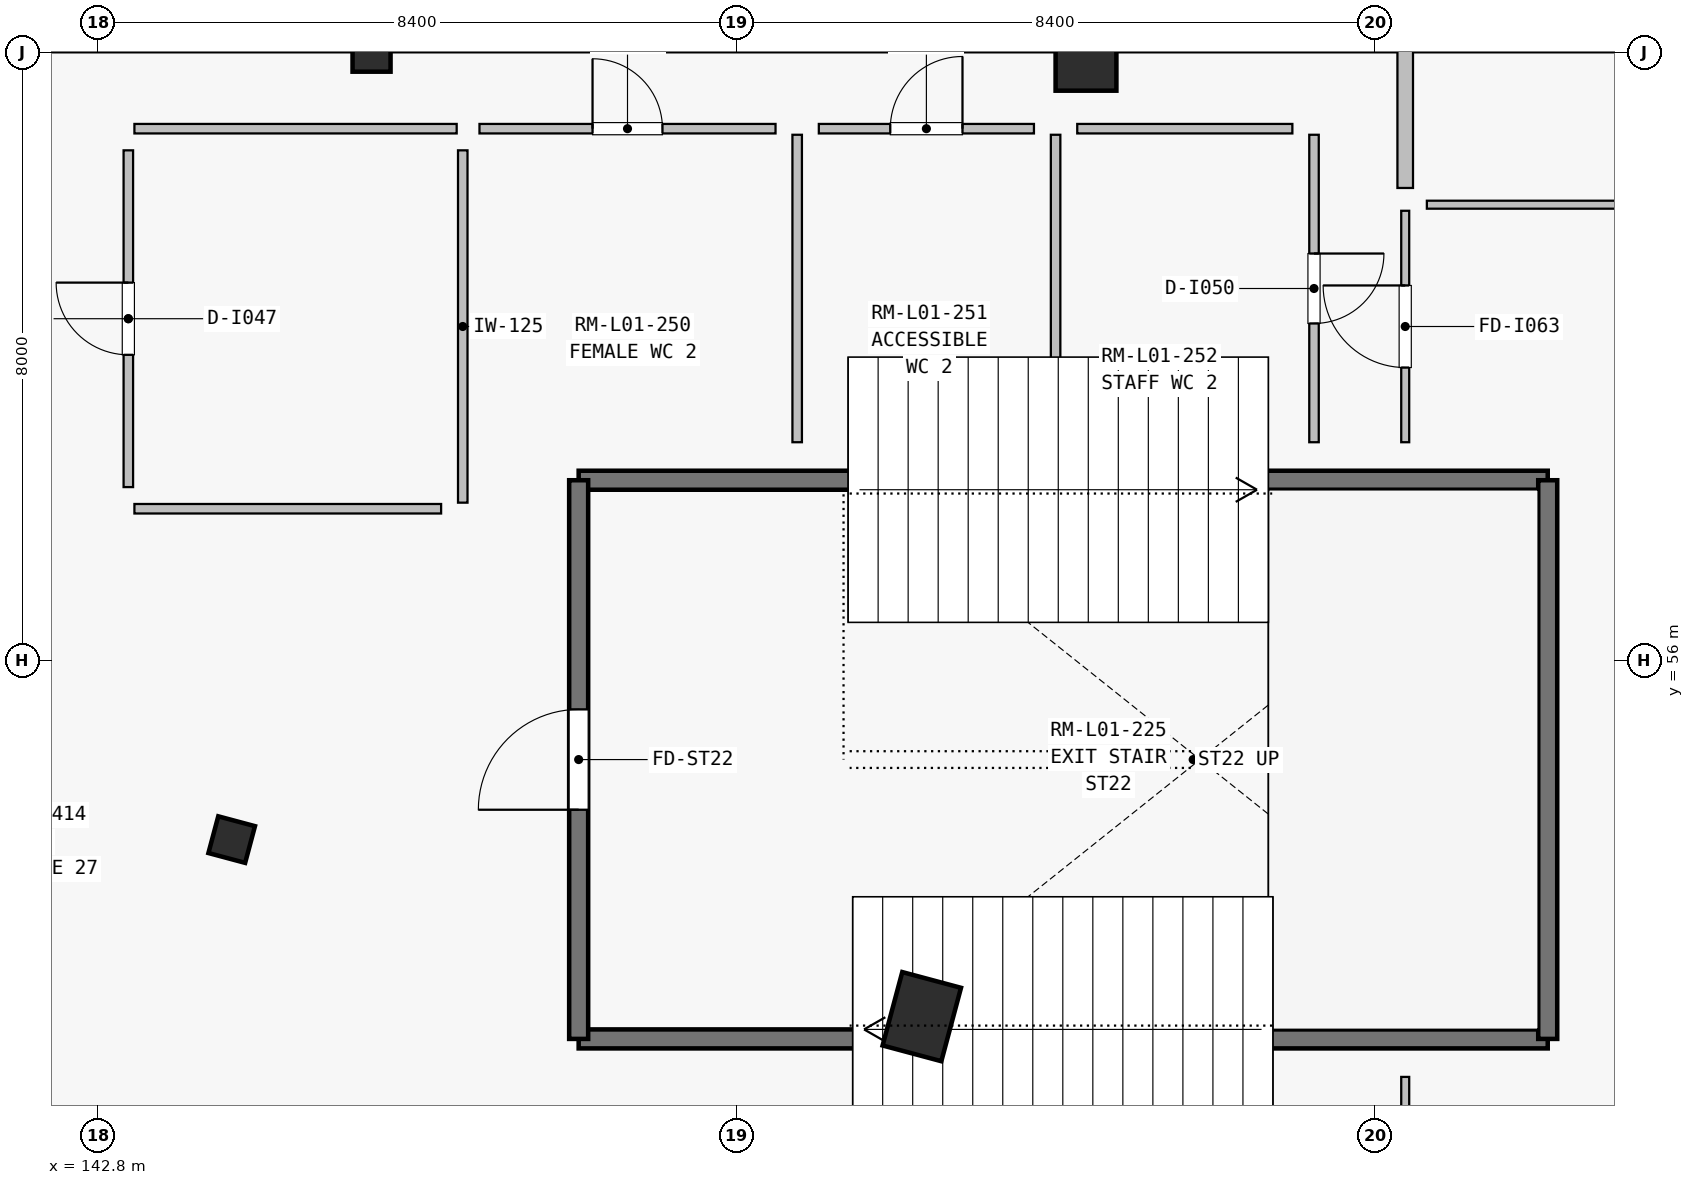
"""IFC4 building model, lengths in metres.
Left out: names, types, materials, properties, quantities, classifications, styles, units other than length and angle.
Written with IfcOpenShell. Run it as: python <this file> out.ifc"""

import sys

from ifc_helpers import new_model, si_unit, direction, frame, frame_2d, origin, origin_2d, place, context, subcontext, project, spatial, rectangle, i_section, extrude, element, fill, save


model = new_model("IFC4")
c1 = context("Model", 3, precision=1e-05, world=origin(), true_north=direction((0.0, 1.0)))
c2 = subcontext(c1, "Body", "Model", "MODEL_VIEW")
j1 = project(units=[si_unit("LENGTHUNIT", "METRE"), si_unit("PLANEANGLEUNIT", "RADIAN")], contexts=[c1])
p1 = place(None, origin())
s1 = spatial("IfcSite", under=j1, at=p1, CompositionType="ELEMENT")
p2 = place(p1, origin())
s2 = spatial("IfcBuilding", under=s1, at=p2, CompositionType="ELEMENT")
p3 = place(p2, frame((0.0, 0.0, 5.4)))
s3 = spatial("IfcBuildingStorey", under=s2, at=p3, CompositionType="ELEMENT", Elevation=5.4)
for number, where, z_axis, x_axis in (
    (1, (146.4, 64.0, 0.0), (0.0, 0.0, 1.0), (1.0, 0.0, 0.0)),
    (2, (144.56, 53.647, 0.0), (0.0, 0.0, 1.0), (0.966, -0.259, 0.0)),
):
    element("IfcColumn", number, at=place(p3, frame(where, z_axis=z_axis, x_axis=x_axis)), inside=s3, PredefinedType="COLUMN", context=c2, shape_type="SweptSolid", body=[
        extrude(i_section(OverallWidth=0.5, OverallDepth=0.5, WebThickness=0.02, FlangeThickness=0.035, at=origin_2d()), origin(), (0.0, 0.0, 1.0), 4.5),
    ])
for number, where, z_axis, x_axis in (
    (3, (155.8, 64.0, 0.0), (0.0, 0.0, 1.0), (1.0, 0.0, 0.0)),
    (4, (153.64, 51.318, 0.0), (0.0, 0.0, 1.0), (0.966, -0.259, 0.0)),
):
    element("IfcColumn", number, at=place(p3, frame(where, z_axis=z_axis, x_axis=x_axis)), inside=s3, PredefinedType="COLUMN", context=c2, shape_type="SweptSolid", body=[
        extrude(rectangle(XDim=0.8, YDim=1.0, at=origin_2d()), origin(), (0.0, 0.0, 1.0), 4.5),
    ])
for number, where, z_axis, x_axis in (
    (5, (149.125, 51.025, 0.0), (0.0, 0.0, 1.0), (1.0, 0.0, 0.0)),
    (6, (149.125, 58.375, 0.0), (0.0, 0.0, 1.0), (1.0, 0.0, 0.0)),
):
    element("IfcWall", number, at=place(p3, frame(where, z_axis=z_axis, x_axis=x_axis)), inside=s3, PredefinedType="SHEAR", context=c2, shape_type="SweptSolid", body=[
        extrude(rectangle(XDim=12.75, YDim=0.25, at=frame_2d((6.375, 0.0))), origin(), (0.0, 0.0, 1.0), 4.5),
    ])
p4 = place(p3, frame((149.125, 51.025, 0.0), z_axis=(0.0, 0.0, 1.0), x_axis=(0.0, 1.0, 0.0)))
e7 = element("IfcWall", 7, at=p4, inside=s3, PredefinedType="SHEAR", context=c2, shape_type="SweptSolid", body=[
    extrude(rectangle(XDim=7.35, YDim=0.25, at=frame_2d((3.675, 0.0))), origin(), (0.0, 0.0, 1.0), 4.5),
])
p5 = place(p4, frame((3.015, 0.0, 0.0)))
e8 = element("IfcOpeningElement", 8, at=p5, cuts=e7, PredefinedType="OPENING", context=c2, shape_type="SweptSolid", body=[
    extrude(rectangle(XDim=1.32, YDim=2.2, at=frame_2d((0.66, 1.1))), frame((0.0, 0.135, 0.0), z_axis=(0.0, -1.0, 0.0), x_axis=(1.0, 0.0, 0.0)), (0.0, 0.0, 1.0), 0.27),
])
p6 = place(p3, frame((161.875, 51.025, 0.0), z_axis=(0.0, 0.0, 1.0), x_axis=(0.0, 1.0, 0.0)))
e9 = element("IfcWall", 9, at=p6, inside=s3, PredefinedType="SHEAR", context=c2, shape_type="SweptSolid", body=[
    extrude(rectangle(XDim=7.35, YDim=0.25, at=frame_2d((3.675, 0.0))), origin(), (0.0, 0.0, 1.0), 4.5),
])
p7 = place(p3, frame((143.28, 63.0, 0.0), z_axis=(0.0, 0.0, 1.0), x_axis=(1.0, 0.0, 0.0)))
e10 = element("IfcWall", 10, at=p7, inside=s3, PredefinedType="PARTITIONING", context=c2, shape_type="SweptSolid", body=[
    extrude(rectangle(XDim=4.24, YDim=0.125, at=frame_2d((2.12, 0.0))), origin(), (0.0, 0.0, 1.0), 3.475),
])
p8 = place(p3, frame((147.6, 62.715, 0.0), z_axis=(0.0, 0.0, 1.0), x_axis=(0.0, -1.0, 0.0)))
e11 = element("IfcWall", 11, at=p8, inside=s3, PredefinedType="PARTITIONING", context=c2, shape_type="SweptSolid", body=[
    extrude(rectangle(XDim=4.635, YDim=0.125, at=frame_2d((2.317, 0.0))), origin(), (0.0, 0.0, 1.0), 4.2),
])
p9 = place(p3, frame((147.315, 58.0, 0.0), z_axis=(0.0, 0.0, 1.0), x_axis=(-1.0, 0.0, 0.0)))
e12 = element("IfcWall", 12, at=p9, inside=s3, PredefinedType="PARTITIONING", context=c2, shape_type="SweptSolid", body=[
    extrude(rectangle(XDim=4.035, YDim=0.125, at=frame_2d((2.018, 0.0))), origin(), (0.0, 0.0, 1.0), 3.475),
])
p10 = place(p3, frame((143.2, 58.285, 0.0), z_axis=(0.0, 0.0, 1.0), x_axis=(0.0, 1.0, 0.0)))
e13 = element("IfcWall", 13, at=p10, inside=s3, PredefinedType="PARTITIONING", context=c2, shape_type="SweptSolid", body=[
    extrude(rectangle(XDim=4.43, YDim=0.125, at=frame_2d((2.215, 0.0))), origin(), (0.0, 0.0, 1.0), 4.2),
])
p11 = place(p10, frame((1.74, 0.0, 0.0)))
e14 = element("IfcOpeningElement", 14, at=p11, cuts=e13, PredefinedType="OPENING", context=c2, shape_type="SweptSolid", body=[
    extrude(rectangle(XDim=0.95, YDim=2.1, at=frame_2d((0.475, 1.05))), frame((0.0, 0.073, 0.0), z_axis=(0.0, -1.0, 0.0), x_axis=(1.0, 0.0, 0.0)), (0.0, 0.0, 1.0), 0.145),
])
p12 = place(p3, frame((152.0, 62.92, 0.0), z_axis=(0.0, 0.0, 1.0), x_axis=(0.0, -1.0, 0.0)))
e15 = element("IfcWall", 15, at=p12, inside=s3, PredefinedType="PARTITIONING", context=c2, shape_type="SweptSolid", body=[
    extrude(rectangle(XDim=4.045, YDim=0.125, at=frame_2d((2.022, 0.0))), origin(), (0.0, 0.0, 1.0), 4.2),
])
p13 = place(p3, frame((147.82, 63.0, 0.0), z_axis=(0.0, 0.0, 1.0), x_axis=(1.0, 0.0, 0.0)))
e16 = element("IfcWall", 16, at=p13, inside=s3, PredefinedType="PARTITIONING", context=c2, shape_type="SweptSolid", body=[
    extrude(rectangle(XDim=3.895, YDim=0.125, at=frame_2d((1.948, 0.0))), origin(), (0.0, 0.0, 1.0), 4.2),
])
p14 = place(p13, frame((1.488, 0.0, 0.0)))
e17 = element("IfcOpeningElement", 17, at=p14, cuts=e16, PredefinedType="OPENING", context=c2, shape_type="SweptSolid", body=[
    extrude(rectangle(XDim=0.92, YDim=2.1, at=frame_2d((0.46, 1.05))), frame((0.0, 0.073, 0.0), z_axis=(0.0, -1.0, 0.0), x_axis=(1.0, 0.0, 0.0)), (0.0, 0.0, 1.0), 0.145),
])
p15 = place(p3, frame((155.4, 62.92, 0.0), z_axis=(0.0, 0.0, 1.0), x_axis=(0.0, -1.0, 0.0)))
e18 = element("IfcWall", 18, at=p15, inside=s3, PredefinedType="PARTITIONING", context=c2, shape_type="SweptSolid", body=[
    extrude(rectangle(XDim=4.045, YDim=0.125, at=frame_2d((2.022, 0.0))), origin(), (0.0, 0.0, 1.0), 4.2),
])
p16 = place(p3, frame((152.285, 63.0, 0.0), z_axis=(0.0, 0.0, 1.0), x_axis=(1.0, 0.0, 0.0)))
e19 = element("IfcWall", 19, at=p16, inside=s3, PredefinedType="PARTITIONING", context=c2, shape_type="SweptSolid", body=[
    extrude(rectangle(XDim=2.83, YDim=0.125, at=frame_2d((1.415, 0.0))), origin(), (0.0, 0.0, 1.0), 4.2),
])
p17 = place(p16, frame((0.94, 0.0, 0.0)))
e20 = element("IfcOpeningElement", 20, at=p17, cuts=e19, PredefinedType="OPENING", context=c2, shape_type="SweptSolid", body=[
    extrude(rectangle(XDim=0.95, YDim=2.1, at=frame_2d((0.475, 1.05))), frame((0.0, 0.073, 0.0), z_axis=(0.0, -1.0, 0.0), x_axis=(1.0, 0.0, 0.0)), (0.0, 0.0, 1.0), 0.145),
])
p18 = place(p3, frame((158.8, 62.92, 0.0), z_axis=(0.0, 0.0, 1.0), x_axis=(0.0, -1.0, 0.0)))
e21 = element("IfcWall", 21, at=p18, inside=s3, PredefinedType="PARTITIONING", context=c2, shape_type="SweptSolid", body=[
    extrude(rectangle(XDim=4.045, YDim=0.125, at=frame_2d((2.022, 0.0))), origin(), (0.0, 0.0, 1.0), 4.2),
])
p19 = place(p18, frame((1.562, 0.0, 0.0)))
e22 = element("IfcOpeningElement", 22, at=p19, cuts=e21, PredefinedType="OPENING", context=c2, shape_type="SweptSolid", body=[
    extrude(rectangle(XDim=0.92, YDim=2.1, at=frame_2d((0.46, 1.05))), frame((0.0, 0.073, 0.0), z_axis=(0.0, -1.0, 0.0), x_axis=(1.0, 0.0, 0.0)), (0.0, 0.0, 1.0), 0.145),
])
p20 = place(p3, frame((155.685, 63.0, 0.0), z_axis=(0.0, 0.0, 1.0), x_axis=(1.0, 0.0, 0.0)))
e23 = element("IfcWall", 23, at=p20, inside=s3, PredefinedType="PARTITIONING", context=c2, shape_type="SweptSolid", body=[
    extrude(rectangle(XDim=2.83, YDim=0.125, at=frame_2d((1.415, 0.0))), origin(), (0.0, 0.0, 1.0), 4.2),
])
p21 = place(p3, frame((160.0, 58.875, 0.0), z_axis=(0.0, 0.0, 1.0), x_axis=(0.0, 1.0, 0.0)))
e24 = element("IfcWall", 24, at=p21, inside=s3, PredefinedType="PARTITIONING", context=c2, shape_type="SweptSolid", body=[
    extrude(rectangle(XDim=3.045, YDim=0.105, at=frame_2d((1.522, 0.0))), origin(), (0.0, 0.0, 1.0), 4.2),
])
p22 = place(p21, frame((0.982, 0.0, 0.0)))
e25 = element("IfcOpeningElement", 25, at=p22, cuts=e24, PredefinedType="OPENING", context=c2, shape_type="SweptSolid", body=[
    extrude(rectangle(XDim=1.08, YDim=2.15, at=frame_2d((0.54, 1.075))), frame((0.0, 0.062, 0.0), z_axis=(0.0, -1.0, 0.0), x_axis=(1.0, 0.0, 0.0)), (0.0, 0.0, 1.0), 0.125),
])
p23 = place(p3, frame((160.285, 62.0, 0.0), z_axis=(0.0, 0.0, 1.0), x_axis=(1.0, 0.0, 0.0)))
e26 = element("IfcWall", 26, at=p23, inside=s3, PredefinedType="PARTITIONING", context=c2, shape_type="SweptSolid", body=[
    extrude(rectangle(XDim=18.039, YDim=0.105, at=frame_2d((9.02, 0.0))), origin(), (0.0, 0.0, 1.0), 3.475),
])
p24 = place(p3, frame((160.0, 48.725, 0.0), z_axis=(0.0, 0.0, 1.0), x_axis=(0.0, 1.0, 0.0)))
e27 = element("IfcWall", 27, at=p24, inside=s3, PredefinedType="PARTITIONING", context=c2, shape_type="SweptSolid", body=[
    extrude(rectangle(XDim=1.8, YDim=0.105, at=frame_2d((0.9, 0.0))), origin(), (0.0, 0.0, 1.0), 4.2),
])
p25 = place(p3, frame((160.0, 62.22, 0.0), z_axis=(0.0, 0.0, 1.0), x_axis=(0.0, 1.0, 0.0)))
e28 = element("IfcWall", 28, at=p25, inside=s3, PredefinedType="SOLIDWALL", context=c2, shape_type="SweptSolid", body=[
    extrude(rectangle(XDim=6.905, YDim=0.205, at=frame_2d((3.453, 0.0))), origin(), (0.0, 0.0, 1.0), 3.642),
])
p26 = place(p5, origin())
e29 = element("IfcDoor", 29, at=p26, inside=s3, OperationType="SINGLE_SWING_LEFT", PredefinedType="DOOR", context=c2, shape_type="SweptSolid", body=[
    extrude(rectangle(XDim=1.32, YDim=2.2, at=frame_2d((0.66, 1.1))), frame((0.0, 0.025, 0.0), z_axis=(0.0, -1.0, 0.0), x_axis=(1.0, 0.0, 0.0)), (0.0, 0.0, 1.0), 0.05),
])
fill(e8, e29)
p27 = place(p11, origin())
e30 = element("IfcDoor", 30, at=p27, inside=s3, OperationType="SINGLE_SWING_RIGHT", PredefinedType="DOOR", context=c2, shape_type="SweptSolid", body=[
    extrude(rectangle(XDim=0.95, YDim=2.1, at=frame_2d((0.475, 1.05))), frame((0.0, 0.025, 0.0), z_axis=(0.0, -1.0, 0.0), x_axis=(1.0, 0.0, 0.0)), (0.0, 0.0, 1.0), 0.05),
])
fill(e14, e30)
p28 = place(p14, origin())
e31 = element("IfcDoor", 31, at=p28, inside=s3, OperationType="SINGLE_SWING_LEFT", PredefinedType="DOOR", context=c2, shape_type="SweptSolid", body=[
    extrude(rectangle(XDim=0.92, YDim=2.1, at=frame_2d((0.46, 1.05))), frame((0.0, 0.025, 0.0), z_axis=(0.0, -1.0, 0.0), x_axis=(1.0, 0.0, 0.0)), (0.0, 0.0, 1.0), 0.05),
])
fill(e17, e31)
p29 = place(p17, origin())
e32 = element("IfcDoor", 32, at=p29, inside=s3, OperationType="SINGLE_SWING_RIGHT", PredefinedType="DOOR", context=c2, shape_type="SweptSolid", body=[
    extrude(rectangle(XDim=0.95, YDim=2.1, at=frame_2d((0.475, 1.05))), frame((0.0, 0.025, 0.0), z_axis=(0.0, -1.0, 0.0), x_axis=(1.0, 0.0, 0.0)), (0.0, 0.0, 1.0), 0.05),
])
fill(e20, e32)
p30 = place(p19, origin())
e33 = element("IfcDoor", 33, at=p30, inside=s3, OperationType="SINGLE_SWING_LEFT", PredefinedType="DOOR", context=c2, shape_type="SweptSolid", body=[
    extrude(rectangle(XDim=0.92, YDim=2.1, at=frame_2d((0.46, 1.05))), frame((0.0, 0.025, 0.0), z_axis=(0.0, -1.0, 0.0), x_axis=(1.0, 0.0, 0.0)), (0.0, 0.0, 1.0), 0.05),
])
fill(e22, e33)
p31 = place(p22, origin())
e34 = element("IfcDoor", 34, at=p31, inside=s3, OperationType="SINGLE_SWING_RIGHT", PredefinedType="DOOR", context=c2, shape_type="SweptSolid", body=[
    extrude(rectangle(XDim=1.08, YDim=2.15, at=frame_2d((0.54, 1.075))), frame((0.0, 0.025, 0.0), z_axis=(0.0, -1.0, 0.0), x_axis=(1.0, 0.0, 0.0)), (0.0, 0.0, 1.0), 0.05),
])
fill(e25, e34)
save(model, sys.argv[1])
